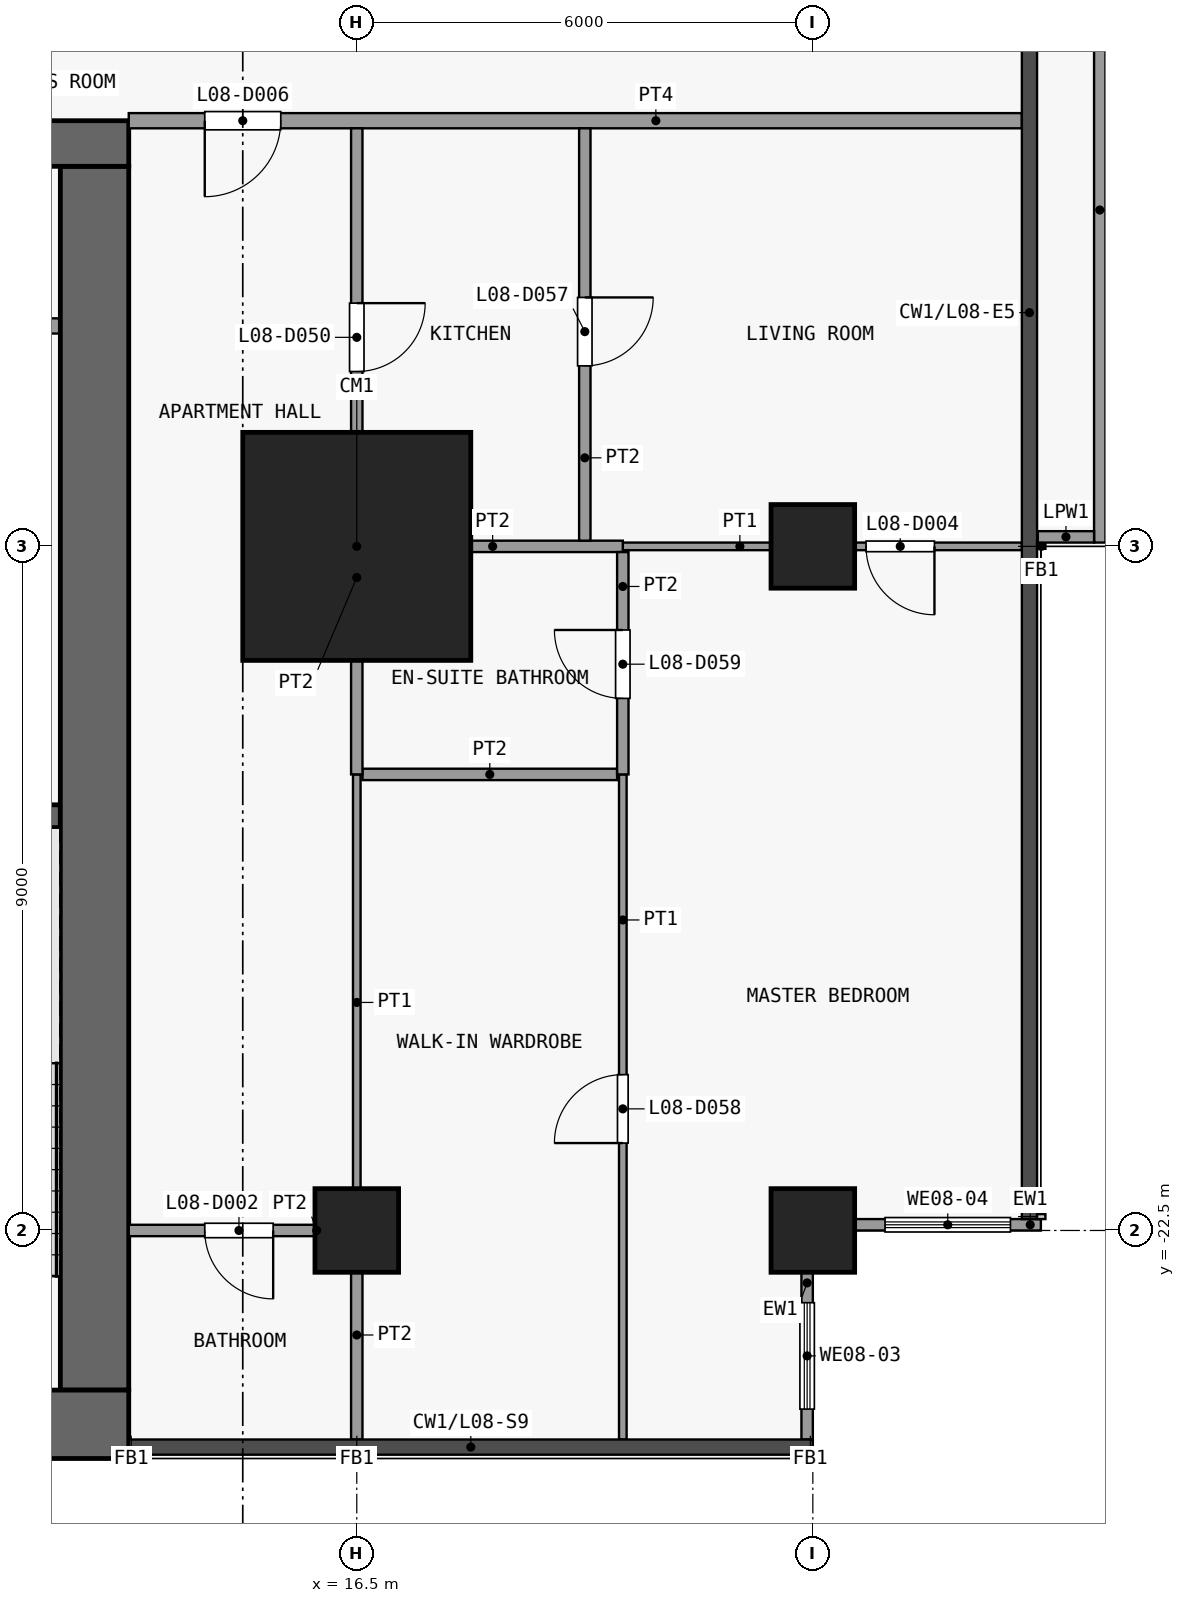
"""IFC4 building model, lengths in metres.
Left out: names, types, materials, properties, quantities, classifications, styles, units other than length and angle.
Written with IfcOpenShell. Run it as: python <this file> out.ifc"""

import sys

from ifc_helpers import new_model, si_unit, direction, frame, frame_2d, origin, origin_2d, place, context, subcontext, project, spatial, rectangle, extrude, element, fill, save


model = new_model("IFC4")
c1 = context("Model", 3, precision=1e-05, world=origin(), true_north=direction((0.0, 1.0)))
c2 = subcontext(c1, "Body", "Model", "MODEL_VIEW")
j1 = project(units=[si_unit("LENGTHUNIT", "METRE"), si_unit("PLANEANGLEUNIT", "RADIAN")], contexts=[c1])
p1 = place(None, origin())
s1 = spatial("IfcSite", under=j1, at=p1, CompositionType="ELEMENT")
p2 = place(p1, origin())
s2 = spatial("IfcBuilding", under=s1, at=p2, CompositionType="ELEMENT")
p3 = place(p2, frame((0.0, 0.0, 39.7)))
s3 = spatial("IfcBuildingStorey", under=s2, at=p3, CompositionType="ELEMENT", Elevation=39.7)
p4 = place(p3, frame((16.5, -22.5, 0.0), z_axis=(0.0, 0.0, 1.0), x_axis=(1.0, 0.0, 0.0)))
e1 = element("IfcColumn", 1, at=p4, inside=s3, PredefinedType="COLUMN", context=c2, shape_type="SweptSolid", body=[
    extrude(rectangle(XDim=1.1, YDim=1.1, at=origin_2d()), origin(), (0.0, 0.0, 1.0), 3.6),
])
p5 = place(p3, frame((16.5, -13.5, 0.0), z_axis=(0.0, 0.0, 1.0), x_axis=(1.0, 0.0, 0.0)))
e2 = element("IfcColumn", 2, at=p5, inside=s3, PredefinedType="COLUMN", context=c2, shape_type="SweptSolid", body=[
    extrude(rectangle(XDim=3.0, YDim=3.0, at=origin_2d()), origin(), (0.0, 0.0, 1.0), 3.6),
])
for number, where, z_axis, x_axis in (
    (3, (22.5, -22.5, 0.0), (0.0, 0.0, 1.0), (1.0, 0.0, 0.0)),
    (4, (22.5, -13.5, 0.0), (0.0, 0.0, 1.0), (1.0, 0.0, 0.0)),
):
    element("IfcColumn", number, at=place(p3, frame(where, z_axis=z_axis, x_axis=x_axis)), inside=s3, PredefinedType="COLUMN", context=c2, shape_type="SweptSolid", body=[
        extrude(rectangle(XDim=1.1, YDim=1.1, at=origin_2d()), origin(), (0.0, 0.0, 1.0), 3.6),
    ])
p6 = place(p3, frame((-13.5, -25.05, 0.0), z_axis=(0.0, 0.0, 1.0), x_axis=(1.0, 0.0, 0.0)))
e5 = element("IfcWall", 5, at=p6, inside=s3, PredefinedType="SHEAR", context=c2, shape_type="SweptSolid", body=[
    extrude(rectangle(XDim=27.0, YDim=0.9, at=frame_2d((13.5, 0.0))), origin(), (0.0, 0.0, 1.0), 3.3),
])
p7 = place(p3, frame((-13.5, -8.2, 0.0), z_axis=(0.0, 0.0, 1.0), x_axis=(1.0, 0.0, 0.0)))
e6 = element("IfcWall", 6, at=p7, inside=s3, PredefinedType="SHEAR", context=c2, shape_type="SweptSolid", body=[
    extrude(rectangle(XDim=27.0, YDim=0.6, at=frame_2d((13.5, 0.0))), origin(), (0.0, 0.0, 1.0), 3.3),
])
p8 = place(p7, frame((7.8, 0.0, 0.0)))
e7 = element("IfcOpeningElement", 7, at=p8, cuts=e6, PredefinedType="OPENING", context=c2, shape_type="SweptSolid", body=[
    extrude(rectangle(XDim=1.8, YDim=2.1, at=frame_2d((0.9, 1.05))), frame((0.0, 0.31, 0.0), z_axis=(0.0, -1.0, 0.0), x_axis=(1.0, 0.0, 0.0)), (0.0, 0.0, 1.0), 0.62),
])
p9 = place(p7, frame((17.4, 0.0, 0.0)))
e8 = element("IfcOpeningElement", 8, at=p9, cuts=e6, PredefinedType="OPENING", context=c2, shape_type="SweptSolid", body=[
    extrude(rectangle(XDim=1.8, YDim=2.1, at=frame_2d((0.9, 1.05))), frame((0.0, 0.31, 0.0), z_axis=(0.0, -1.0, 0.0), x_axis=(1.0, 0.0, 0.0)), (0.0, 0.0, 1.0), 0.62),
])
p10 = place(p7, frame((2.725, 0.0, 0.0)))
e9 = element("IfcOpeningElement", 9, at=p10, cuts=e6, PredefinedType="OPENING", context=c2, shape_type="SweptSolid", body=[
    extrude(rectangle(XDim=0.9, YDim=2.1, at=frame_2d((0.45, 1.05))), frame((0.0, 0.31, 0.0), z_axis=(0.0, -1.0, 0.0), x_axis=(1.0, 0.0, 0.0)), (0.0, 0.0, 1.0), 0.62),
])
p11 = place(p7, frame((23.375, 0.0, 0.0)))
e10 = element("IfcOpeningElement", 10, at=p11, cuts=e6, PredefinedType="OPENING", context=c2, shape_type="SweptSolid", body=[
    extrude(rectangle(XDim=0.9, YDim=2.1, at=frame_2d((0.45, 1.05))), frame((0.0, 0.31, 0.0), z_axis=(0.0, -1.0, 0.0), x_axis=(1.0, 0.0, 0.0)), (0.0, 0.0, 1.0), 0.62),
])
p12 = place(p3, frame((13.05, -24.6, 0.0), z_axis=(0.0, 0.0, 1.0), x_axis=(0.0, 1.0, 0.0)))
e11 = element("IfcWall", 11, at=p12, inside=s3, PredefinedType="SHEAR", context=c2, shape_type="SweptSolid", body=[
    extrude(rectangle(XDim=16.1, YDim=0.9, at=frame_2d((8.05, 0.0))), origin(), (0.0, 0.0, 1.0), 3.3),
])
p13 = place(p3, frame((9.5, -17.05, 0.0), z_axis=(0.0, 0.0, 1.0), x_axis=(1.0, 0.0, 0.0)))
e12 = element("IfcWall", 12, at=p13, inside=s3, PredefinedType="SHEAR", context=c2, shape_type="SweptSolid", body=[
    extrude(rectangle(XDim=3.1, YDim=0.3, at=frame_2d((1.55, 0.0))), origin(), (0.0, 0.0, 1.0), 3.3),
])
p14 = place(p3, frame((11.15, -10.6, 0.0), z_axis=(0.0, 0.0, 1.0), x_axis=(1.0, 0.0, 0.0)))
e13 = element("IfcWall", 13, at=p14, inside=s3, PredefinedType="PARTITIONING", context=c2, shape_type="SweptSolid", body=[
    extrude(rectangle(XDim=1.45, YDim=0.2, at=frame_2d((0.725, 0.0))), origin(), (0.0, 0.0, 1.0), 3.3),
])
p15 = place(p3, frame((22.425, -23.05, 0.0), z_axis=(0.0, 0.0, 1.0), x_axis=(0.0, -1.0, 0.0)))
e14 = element("IfcWall", 14, at=p15, inside=s3, PredefinedType="SOLIDWALL", context=c2, shape_type="SweptSolid", body=[
    extrude(rectangle(XDim=2.2, YDim=0.15, at=frame_2d((1.1, 0.0))), origin(), (0.0, 0.0, 1.0), 3.3),
])
p16 = place(p15, frame((0.4, 0.0, 0.9)))
e15 = element("IfcOpeningElement", 15, at=p16, cuts=e14, PredefinedType="OPENING", context=c2, shape_type="SweptSolid", body=[
    extrude(rectangle(XDim=1.4, YDim=2.4, at=frame_2d((0.7, 1.2))), frame((0.0, 0.085, 0.0), z_axis=(0.0, -1.0, 0.0), x_axis=(1.0, 0.0, 0.0)), (0.0, 0.0, 1.0), 0.17),
])
p17 = place(p3, frame((25.5, -22.425, 0.0), z_axis=(0.0, 0.0, 1.0), x_axis=(-1.0, 0.0, 0.0)))
e16 = element("IfcWall", 16, at=p17, inside=s3, PredefinedType="SOLIDWALL", context=c2, shape_type="SweptSolid", body=[
    extrude(rectangle(XDim=2.45, YDim=0.15, at=frame_2d((1.225, 0.0))), origin(), (0.0, 0.0, 1.0), 3.3),
])
p18 = place(p17, frame((0.4, 0.0, 0.9)))
e17 = element("IfcOpeningElement", 17, at=p18, cuts=e16, PredefinedType="OPENING", context=c2, shape_type="SweptSolid", body=[
    extrude(rectangle(XDim=1.65, YDim=2.4, at=frame_2d((0.825, 1.2))), frame((0.0, 0.085, 0.0), z_axis=(0.0, -1.0, 0.0), x_axis=(1.0, 0.0, 0.0)), (0.0, 0.0, 1.0), 0.17),
])
p19 = place(p3, frame((26.275, -4.7, 0.0), z_axis=(0.0, 0.0, 1.0), x_axis=(0.0, -1.0, 0.0)))
e18 = element("IfcWall", 18, at=p19, inside=s3, PredefinedType="PARAPET", context=c2, shape_type="SweptSolid", body=[
    extrude(rectangle(XDim=8.75, YDim=0.15, at=frame_2d((4.375, 0.0))), origin(), (0.0, 0.0, 1.0), 1.15),
])
p20 = place(p3, frame((26.2, -13.375, 0.0), z_axis=(0.0, 0.0, 1.0), x_axis=(-1.0, 0.0, 0.0)))
e19 = element("IfcWall", 19, at=p20, inside=s3, PredefinedType="PARAPET", context=c2, shape_type="SweptSolid", body=[
    extrude(rectangle(XDim=0.74, YDim=0.15, at=frame_2d((0.37, 0.0))), origin(), (0.0, 0.0, 1.0), 1.15),
])
p21 = place(p3, frame((13.5, -22.5, 0.0), z_axis=(0.0, 0.0, 1.0), x_axis=(1.0, 0.0, 0.0)))
e20 = element("IfcWall", 20, at=p21, inside=s3, PredefinedType="PARTITIONING", context=c2, shape_type="SweptSolid", body=[
    extrude(rectangle(XDim=2.925, YDim=0.15, at=frame_2d((1.462, 0.0))), origin(), (0.0, 0.0, 1.0), 3.3),
])
p22 = place(p21, frame((1.0, 0.0, 0.0)))
e21 = element("IfcOpeningElement", 21, at=p22, cuts=e20, PredefinedType="OPENING", context=c2, shape_type="SweptSolid", body=[
    extrude(rectangle(XDim=0.9, YDim=2.1, at=frame_2d((0.45, 1.05))), frame((0.0, 0.085, 0.0), z_axis=(0.0, -1.0, 0.0), x_axis=(1.0, 0.0, 0.0)), (0.0, 0.0, 1.0), 0.17),
])
p23 = place(p3, frame((16.575, -16.5, 0.0), z_axis=(0.0, 0.0, 1.0), x_axis=(1.0, 0.0, 0.0)))
e22 = element("IfcWall", 22, at=p23, inside=s3, PredefinedType="PARTITIONING", context=c2, shape_type="SweptSolid", body=[
    extrude(rectangle(XDim=3.35, YDim=0.15, at=frame_2d((1.675, 0.0))), origin(), (0.0, 0.0, 1.0), 3.3),
])
p24 = place(p3, frame((20.0, -13.5, 0.0), z_axis=(0.0, 0.0, 1.0), x_axis=(1.0, 0.0, 0.0)))
e23 = element("IfcWall", 23, at=p24, inside=s3, PredefinedType="PARTITIONING", context=c2, shape_type="SweptSolid", body=[
    extrude(rectangle(XDim=5.25, YDim=0.1, at=frame_2d((2.625, 0.0))), origin(), (0.0, 0.0, 1.0), 3.3),
])
p25 = place(p24, frame((3.2, 0.0, 0.0)))
e24 = element("IfcOpeningElement", 24, at=p25, cuts=e23, PredefinedType="OPENING", context=c2, shape_type="SweptSolid", body=[
    extrude(rectangle(XDim=0.9, YDim=2.1, at=frame_2d((0.45, 1.05))), frame((0.0, 0.06, 0.0), z_axis=(0.0, -1.0, 0.0), x_axis=(1.0, 0.0, 0.0)), (0.0, 0.0, 1.0), 0.12),
])
p26 = place(p3, frame((16.575, -13.5, 0.0), z_axis=(0.0, 0.0, 1.0), x_axis=(1.0, 0.0, 0.0)))
e25 = element("IfcWall", 25, at=p26, inside=s3, PredefinedType="PARTITIONING", context=c2, shape_type="SweptSolid", body=[
    extrude(rectangle(XDim=3.425, YDim=0.15, at=frame_2d((1.712, 0.0))), origin(), (0.0, 0.0, 1.0), 3.3),
])
p27 = place(p3, frame((13.5, -7.9, 0.0), z_axis=(0.0, 0.0, 1.0), x_axis=(1.0, 0.0, 0.0)))
e26 = element("IfcWall", 26, at=p27, inside=s3, PredefinedType="PARTITIONING", context=c2, shape_type="SweptSolid", body=[
    extrude(rectangle(XDim=11.75, YDim=0.2, at=frame_2d((5.875, 0.0))), origin(), (0.0, 0.0, 1.0), 3.3),
])
p28 = place(p27, frame((1.0, 0.0, 0.0)))
e27 = element("IfcOpeningElement", 27, at=p28, cuts=e26, PredefinedType="OPENING", context=c2, shape_type="SweptSolid", body=[
    extrude(rectangle(XDim=1.0, YDim=2.1, at=frame_2d((0.5, 1.05))), frame((0.0, 0.11, 0.0), z_axis=(0.0, -1.0, 0.0), x_axis=(1.0, 0.0, 0.0)), (0.0, 0.0, 1.0), 0.22),
])
p29 = place(p3, frame((16.5, -22.5, 0.0), z_axis=(0.0, 0.0, 1.0), x_axis=(0.0, 1.0, 0.0)))
e28 = element("IfcWall", 28, at=p29, inside=s3, PredefinedType="PARTITIONING", context=c2, shape_type="SweptSolid", body=[
    extrude(rectangle(XDim=6.0, YDim=0.1, at=frame_2d((3.0, 0.0))), origin(), (0.0, 0.0, 1.0), 3.3),
])
p30 = place(p3, frame((16.5, -25.25, 0.0), z_axis=(0.0, 0.0, 1.0), x_axis=(0.0, 1.0, 0.0)))
e29 = element("IfcWall", 29, at=p30, inside=s3, PredefinedType="PARTITIONING", context=c2, shape_type="SweptSolid", body=[
    extrude(rectangle(XDim=2.75, YDim=0.15, at=frame_2d((1.375, 0.0))), origin(), (0.0, 0.0, 1.0), 3.3),
])
p31 = place(p3, frame((16.5, -16.5, 0.0), z_axis=(0.0, 0.0, 1.0), x_axis=(0.0, 1.0, 0.0)))
e30 = element("IfcWall", 30, at=p31, inside=s3, PredefinedType="PARTITIONING", context=c2, shape_type="SweptSolid", body=[
    extrude(rectangle(XDim=8.5, YDim=0.15, at=frame_2d((4.25, 0.0))), origin(), (0.0, 0.0, 1.0), 3.3),
])
p32 = place(p31, frame((5.3, 0.0, 0.0)))
e31 = element("IfcOpeningElement", 31, at=p32, cuts=e30, PredefinedType="OPENING", context=c2, shape_type="SweptSolid", body=[
    extrude(rectangle(XDim=0.9, YDim=2.1, at=frame_2d((0.45, 1.05))), frame((0.0, 0.085, 0.0), z_axis=(0.0, -1.0, 0.0), x_axis=(1.0, 0.0, 0.0)), (0.0, 0.0, 1.0), 0.17),
])
p33 = place(p3, frame((19.5, -13.425, 0.0), z_axis=(0.0, 0.0, 1.0), x_axis=(0.0, 1.0, 0.0)))
e32 = element("IfcWall", 32, at=p33, inside=s3, PredefinedType="PARTITIONING", context=c2, shape_type="SweptSolid", body=[
    extrude(rectangle(XDim=5.425, YDim=0.15, at=frame_2d((2.712, 0.0))), origin(), (0.0, 0.0, 1.0), 3.3),
])
p34 = place(p33, frame((2.3, 0.0, 0.0)))
e33 = element("IfcOpeningElement", 33, at=p34, cuts=e32, PredefinedType="OPENING", context=c2, shape_type="SweptSolid", body=[
    extrude(rectangle(XDim=0.9, YDim=2.1, at=frame_2d((0.45, 1.05))), frame((0.0, 0.085, 0.0), z_axis=(0.0, -1.0, 0.0), x_axis=(1.0, 0.0, 0.0)), (0.0, 0.0, 1.0), 0.17),
])
p35 = place(p3, frame((20.0, -25.25, 0.0), z_axis=(0.0, 0.0, 1.0), x_axis=(0.0, 1.0, 0.0)))
e34 = element("IfcWall", 34, at=p35, inside=s3, PredefinedType="PARTITIONING", context=c2, shape_type="SweptSolid", body=[
    extrude(rectangle(XDim=8.75, YDim=0.1, at=frame_2d((4.375, 0.0))), origin(), (0.0, 0.0, 1.0), 3.3),
])
p36 = place(p35, frame((3.9, 0.0, 0.0)))
e35 = element("IfcOpeningElement", 35, at=p36, cuts=e34, PredefinedType="OPENING", context=c2, shape_type="SweptSolid", body=[
    extrude(rectangle(XDim=0.9, YDim=2.1, at=frame_2d((0.45, 1.05))), frame((0.0, 0.06, 0.0), z_axis=(0.0, -1.0, 0.0), x_axis=(1.0, 0.0, 0.0)), (0.0, 0.0, 1.0), 0.12),
])
p37 = place(p3, frame((20.0, -16.5, 0.0), z_axis=(0.0, 0.0, 1.0), x_axis=(0.0, 1.0, 0.0)))
e36 = element("IfcWall", 36, at=p37, inside=s3, PredefinedType="PARTITIONING", context=c2, shape_type="SweptSolid", body=[
    extrude(rectangle(XDim=2.925, YDim=0.15, at=frame_2d((1.462, 0.0))), origin(), (0.0, 0.0, 1.0), 3.3),
])
p38 = place(p37, frame((1.0, 0.0, 0.0)))
e37 = element("IfcOpeningElement", 37, at=p38, cuts=e36, PredefinedType="OPENING", context=c2, shape_type="SweptSolid", body=[
    extrude(rectangle(XDim=0.9, YDim=2.1, at=frame_2d((0.45, 1.05))), frame((0.0, 0.085, 0.0), z_axis=(0.0, -1.0, 0.0), x_axis=(1.0, 0.0, 0.0)), (0.0, 0.0, 1.0), 0.17),
])
p39 = place(p16, origin())
e38 = element("IfcWindow", 38, at=p39, inside=s3, PartitioningType="SINGLE_PANEL", PredefinedType="WINDOW", context=c2, shape_type="SweptSolid", body=[
    extrude(rectangle(XDim=1.4, YDim=2.4, at=frame_2d((0.7, 1.2))), frame((0.0, 0.03, 0.0), z_axis=(0.0, -1.0, 0.0), x_axis=(1.0, 0.0, 0.0)), (0.0, 0.0, 1.0), 0.06),
])
fill(e15, e38)
p40 = place(p18, origin())
e39 = element("IfcWindow", 39, at=p40, inside=s3, PartitioningType="SINGLE_PANEL", PredefinedType="WINDOW", context=c2, shape_type="SweptSolid", body=[
    extrude(rectangle(XDim=1.65, YDim=2.4, at=frame_2d((0.825, 1.2))), frame((0.0, 0.03, 0.0), z_axis=(0.0, -1.0, 0.0), x_axis=(1.0, 0.0, 0.0)), (0.0, 0.0, 1.0), 0.06),
])
fill(e17, e39)
p41 = place(p22, origin())
e40 = element("IfcDoor", 40, at=p41, inside=s3, OperationType="SINGLE_SWING_RIGHT", PredefinedType="DOOR", context=c2, shape_type="SweptSolid", body=[
    extrude(rectangle(XDim=0.9, YDim=2.1, at=frame_2d((0.45, 1.05))), frame((0.0, 0.025, 0.0), z_axis=(0.0, -1.0, 0.0), x_axis=(1.0, 0.0, 0.0)), (0.0, 0.0, 1.0), 0.05),
])
fill(e21, e40)
p42 = place(p25, origin())
e41 = element("IfcDoor", 41, at=p42, inside=s3, OperationType="SINGLE_SWING_RIGHT", PredefinedType="DOOR", context=c2, shape_type="SweptSolid", body=[
    extrude(rectangle(XDim=0.9, YDim=2.1, at=frame_2d((0.45, 1.05))), frame((0.0, 0.025, 0.0), z_axis=(0.0, -1.0, 0.0), x_axis=(1.0, 0.0, 0.0)), (0.0, 0.0, 1.0), 0.05),
])
fill(e24, e41)
p43 = place(p28, origin())
e42 = element("IfcDoor", 42, at=p43, inside=s3, OperationType="SINGLE_SWING_LEFT", PredefinedType="DOOR", context=c2, shape_type="SweptSolid", body=[
    extrude(rectangle(XDim=1.0, YDim=2.1, at=frame_2d((0.5, 1.05))), frame((0.0, 0.025, 0.0), z_axis=(0.0, -1.0, 0.0), x_axis=(1.0, 0.0, 0.0)), (0.0, 0.0, 1.0), 0.05),
])
fill(e27, e42)
p44 = place(p32, origin())
e43 = element("IfcDoor", 43, at=p44, inside=s3, OperationType="SINGLE_SWING_RIGHT", PredefinedType="DOOR", context=c2, shape_type="SweptSolid", body=[
    extrude(rectangle(XDim=0.9, YDim=2.1, at=frame_2d((0.45, 1.05))), frame((0.0, 0.025, 0.0), z_axis=(0.0, -1.0, 0.0), x_axis=(1.0, 0.0, 0.0)), (0.0, 0.0, 1.0), 0.05),
])
fill(e31, e43)
p45 = place(p34, origin())
e44 = element("IfcDoor", 44, at=p45, inside=s3, OperationType="SINGLE_SWING_RIGHT", PredefinedType="DOOR", context=c2, shape_type="SweptSolid", body=[
    extrude(rectangle(XDim=0.9, YDim=2.1, at=frame_2d((0.45, 1.05))), frame((0.0, 0.025, 0.0), z_axis=(0.0, -1.0, 0.0), x_axis=(1.0, 0.0, 0.0)), (0.0, 0.0, 1.0), 0.05),
])
fill(e33, e44)
p46 = place(p36, origin())
e45 = element("IfcDoor", 45, at=p46, inside=s3, OperationType="SINGLE_SWING_RIGHT", PredefinedType="DOOR", context=c2, shape_type="SweptSolid", body=[
    extrude(rectangle(XDim=0.9, YDim=2.1, at=frame_2d((0.45, 1.05))), frame((0.0, 0.025, 0.0), z_axis=(0.0, -1.0, 0.0), x_axis=(1.0, 0.0, 0.0)), (0.0, 0.0, 1.0), 0.05),
])
fill(e35, e45)
p47 = place(p38, origin())
e46 = element("IfcDoor", 46, at=p47, inside=s3, OperationType="SINGLE_SWING_LEFT", PredefinedType="DOOR", context=c2, shape_type="SweptSolid", body=[
    extrude(rectangle(XDim=0.9, YDim=2.1, at=frame_2d((0.45, 1.05))), frame((0.0, 0.025, 0.0), z_axis=(0.0, -1.0, 0.0), x_axis=(1.0, 0.0, 0.0)), (0.0, 0.0, 1.0), 0.05),
])
fill(e37, e46)
save(model, sys.argv[1])
